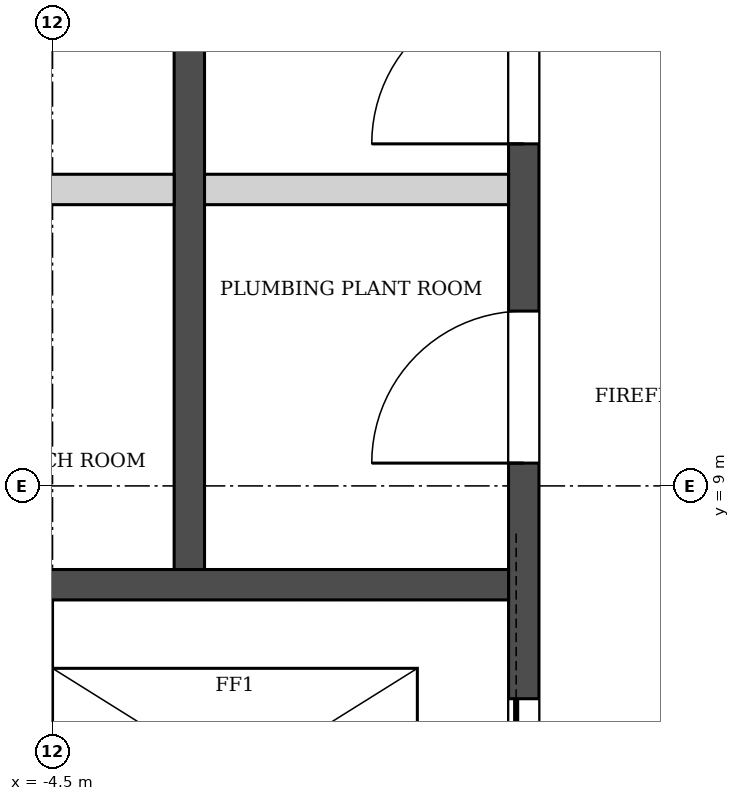
"""IFC4 building model, lengths in metres.
Left out: names, types, materials, properties, quantities, classifications, styles, units other than length and angle.
Written with IfcOpenShell. Run it as: python <this file> out.ifc"""

import sys

from ifc_helpers import new_model, si_unit, direction, frame, frame_2d, origin, place, context, subcontext, project, spatial, rectangle, extrude, element, fill, save


model = new_model("IFC4")
c1 = context("Model", 3, precision=1e-05, world=origin(), true_north=direction((0.0, 1.0)))
c2 = subcontext(c1, "Body", "Model", "MODEL_VIEW")
j1 = project(units=[si_unit("LENGTHUNIT", "METRE"), si_unit("PLANEANGLEUNIT", "RADIAN")], contexts=[c1])
p1 = place(None, origin())
s1 = spatial("IfcSite", under=j1, at=p1, CompositionType="ELEMENT")
p2 = place(p1, origin())
s2 = spatial("IfcBuilding", under=s1, at=p2, CompositionType="ELEMENT")
p3 = place(p2, frame((0.0, 0.0, 218.1)))
s3 = spatial("IfcBuildingStorey", under=s2, at=p3, CompositionType="ELEMENT", Elevation=218.1)
p4 = place(p3, frame((-4.353, 47.177, 0.0), z_axis=(0.0, 0.0, 1.0), x_axis=(-0.500000533701, -0.866025095652, 0.0)))
e1 = element("IfcWall", 1, at=p4, inside=s3, PredefinedType="SOLIDWALL", context=c2, shape_type="SweptSolid", body=[
    extrude(rectangle(XDim=45.573, YDim=0.34, at=frame_2d((22.787, 0.0))), origin(), (0.0, 0.0, 1.0), 5.0),
])
p5 = place(p4, frame((2.68, 0.0, 0.9)))
e2 = element("IfcOpeningElement", 2, at=p5, cuts=e1, PredefinedType="OPENING", context=c2, shape_type="SweptSolid", body=[
    extrude(rectangle(XDim=1.885, YDim=3.0, at=frame_2d((0.942, 1.5))), frame((0.0, 0.18, 0.0), z_axis=(0.0, -1.0, 0.0), x_axis=(1.0, 0.0, 0.0)), (0.0, 0.0, 1.0), 0.36),
])
p6 = place(p4, frame((5.68, 0.0, 0.9)))
e3 = element("IfcOpeningElement", 3, at=p6, cuts=e1, PredefinedType="OPENING", context=c2, shape_type="SweptSolid", body=[
    extrude(rectangle(XDim=1.885, YDim=3.0, at=frame_2d((0.942, 1.5))), frame((0.0, 0.18, 0.0), z_axis=(0.0, -1.0, 0.0), x_axis=(1.0, 0.0, 0.0)), (0.0, 0.0, 1.0), 0.36),
])
p7 = place(p4, frame((8.68, 0.0, 0.9)))
e4 = element("IfcOpeningElement", 4, at=p7, cuts=e1, PredefinedType="OPENING", context=c2, shape_type="SweptSolid", body=[
    extrude(rectangle(XDim=1.885, YDim=3.0, at=frame_2d((0.942, 1.5))), frame((0.0, 0.18, 0.0), z_axis=(0.0, -1.0, 0.0), x_axis=(1.0, 0.0, 0.0)), (0.0, 0.0, 1.0), 0.36),
])
p8 = place(p4, frame((11.68, 0.0, 0.9)))
e5 = element("IfcOpeningElement", 5, at=p8, cuts=e1, PredefinedType="OPENING", context=c2, shape_type="SweptSolid", body=[
    extrude(rectangle(XDim=1.885, YDim=3.0, at=frame_2d((0.942, 1.5))), frame((0.0, 0.18, 0.0), z_axis=(0.0, -1.0, 0.0), x_axis=(1.0, 0.0, 0.0)), (0.0, 0.0, 1.0), 0.36),
])
p9 = place(p4, frame((14.68, 0.0, 0.9)))
e6 = element("IfcOpeningElement", 6, at=p9, cuts=e1, PredefinedType="OPENING", context=c2, shape_type="SweptSolid", body=[
    extrude(rectangle(XDim=1.885, YDim=3.0, at=frame_2d((0.942, 1.5))), frame((0.0, 0.18, 0.0), z_axis=(0.0, -1.0, 0.0), x_axis=(1.0, 0.0, 0.0)), (0.0, 0.0, 1.0), 0.36),
])
p10 = place(p4, frame((17.68, 0.0, 0.9)))
e7 = element("IfcOpeningElement", 7, at=p10, cuts=e1, PredefinedType="OPENING", context=c2, shape_type="SweptSolid", body=[
    extrude(rectangle(XDim=1.885, YDim=3.0, at=frame_2d((0.942, 1.5))), frame((0.0, 0.18, 0.0), z_axis=(0.0, -1.0, 0.0), x_axis=(1.0, 0.0, 0.0)), (0.0, 0.0, 1.0), 0.36),
])
p11 = place(p4, frame((20.68, 0.0, 0.9)))
e8 = element("IfcOpeningElement", 8, at=p11, cuts=e1, PredefinedType="OPENING", context=c2, shape_type="SweptSolid", body=[
    extrude(rectangle(XDim=1.885, YDim=3.0, at=frame_2d((0.942, 1.5))), frame((0.0, 0.18, 0.0), z_axis=(0.0, -1.0, 0.0), x_axis=(1.0, 0.0, 0.0)), (0.0, 0.0, 1.0), 0.36),
])
p12 = place(p4, frame((23.68, 0.0, 0.9)))
e9 = element("IfcOpeningElement", 9, at=p12, cuts=e1, PredefinedType="OPENING", context=c2, shape_type="SweptSolid", body=[
    extrude(rectangle(XDim=1.885, YDim=3.0, at=frame_2d((0.942, 1.5))), frame((0.0, 0.18, 0.0), z_axis=(0.0, -1.0, 0.0), x_axis=(1.0, 0.0, 0.0)), (0.0, 0.0, 1.0), 0.36),
])
p13 = place(p4, frame((26.68, 0.0, 0.9)))
e10 = element("IfcOpeningElement", 10, at=p13, cuts=e1, PredefinedType="OPENING", context=c2, shape_type="SweptSolid", body=[
    extrude(rectangle(XDim=1.885, YDim=3.0, at=frame_2d((0.942, 1.5))), frame((0.0, 0.18, 0.0), z_axis=(0.0, -1.0, 0.0), x_axis=(1.0, 0.0, 0.0)), (0.0, 0.0, 1.0), 0.36),
])
p14 = place(p4, frame((29.68, 0.0, 0.9)))
e11 = element("IfcOpeningElement", 11, at=p14, cuts=e1, PredefinedType="OPENING", context=c2, shape_type="SweptSolid", body=[
    extrude(rectangle(XDim=1.885, YDim=3.0, at=frame_2d((0.942, 1.5))), frame((0.0, 0.18, 0.0), z_axis=(0.0, -1.0, 0.0), x_axis=(1.0, 0.0, 0.0)), (0.0, 0.0, 1.0), 0.36),
])
p15 = place(p4, frame((32.68, 0.0, 0.9)))
e12 = element("IfcOpeningElement", 12, at=p15, cuts=e1, PredefinedType="OPENING", context=c2, shape_type="SweptSolid", body=[
    extrude(rectangle(XDim=1.885, YDim=3.0, at=frame_2d((0.942, 1.5))), frame((0.0, 0.18, 0.0), z_axis=(0.0, -1.0, 0.0), x_axis=(1.0, 0.0, 0.0)), (0.0, 0.0, 1.0), 0.36),
])
p16 = place(p4, frame((35.68, 0.0, 0.9)))
e13 = element("IfcOpeningElement", 13, at=p16, cuts=e1, PredefinedType="OPENING", context=c2, shape_type="SweptSolid", body=[
    extrude(rectangle(XDim=1.885, YDim=3.0, at=frame_2d((0.942, 1.5))), frame((0.0, 0.18, 0.0), z_axis=(0.0, -1.0, 0.0), x_axis=(1.0, 0.0, 0.0)), (0.0, 0.0, 1.0), 0.36),
])
p17 = place(p4, frame((38.68, 0.0, 0.9)))
e14 = element("IfcOpeningElement", 14, at=p17, cuts=e1, PredefinedType="OPENING", context=c2, shape_type="SweptSolid", body=[
    extrude(rectangle(XDim=1.885, YDim=3.0, at=frame_2d((0.942, 1.5))), frame((0.0, 0.18, 0.0), z_axis=(0.0, -1.0, 0.0), x_axis=(1.0, 0.0, 0.0)), (0.0, 0.0, 1.0), 0.36),
])
p18 = place(p4, frame((41.68, 0.0, 0.9)))
e15 = element("IfcOpeningElement", 15, at=p18, cuts=e1, PredefinedType="OPENING", context=c2, shape_type="SweptSolid", body=[
    extrude(rectangle(XDim=1.885, YDim=3.0, at=frame_2d((0.942, 1.5))), frame((0.0, 0.18, 0.0), z_axis=(0.0, -1.0, 0.0), x_axis=(1.0, 0.0, 0.0)), (0.0, 0.0, 1.0), 0.36),
])
p19 = place(p3, frame((-3.6, 8.45, -0.4), z_axis=(0.0, 0.0, 1.0), x_axis=(0.0, 1.0, 0.0)))
e16 = element("IfcWall", 16, at=p19, inside=s3, PredefinedType="SOLIDWALL", context=c2, shape_type="SweptSolid", body=[
    extrude(rectangle(XDim=7.8, YDim=0.2, at=frame_2d((3.9, 0.0))), origin(), (0.0, 0.0, 1.0), 5.4),
])
p20 = place(p3, frame((-1.4, 5.85, -0.4), z_axis=(0.0, 0.0, 1.0), x_axis=(0.0, 1.0, 0.0)))
e17 = element("IfcWall", 17, at=p20, inside=s3, PredefinedType="SOLIDWALL", context=c2, shape_type="SweptSolid", body=[
    extrude(rectangle(XDim=11.75, YDim=0.2, at=frame_2d((5.875, 0.0))), origin(), (0.0, 0.0, 1.0), 5.4),
])
p21 = place(p20, frame((0.65, 0.0, 0.4)))
e18 = element("IfcOpeningElement", 18, at=p21, cuts=e17, PredefinedType="OPENING", context=c2, shape_type="SweptSolid", body=[
    extrude(rectangle(XDim=1.1, YDim=2.1, at=frame_2d((0.55, 1.05))), frame((0.0, 0.11, 0.0), z_axis=(0.0, -1.0, 0.0), x_axis=(1.0, 0.0, 0.0)), (0.0, 0.0, 1.0), 0.22),
])
p22 = place(p20, frame((3.3, 0.0, 0.4)))
e19 = element("IfcOpeningElement", 19, at=p22, cuts=e17, PredefinedType="OPENING", context=c2, shape_type="SweptSolid", body=[
    extrude(rectangle(XDim=1.0, YDim=2.1, at=frame_2d((0.5, 1.05))), frame((0.0, 0.11, 0.0), z_axis=(0.0, -1.0, 0.0), x_axis=(1.0, 0.0, 0.0)), (0.0, 0.0, 1.0), 0.22),
])
p23 = place(p20, frame((5.4, 0.0, 0.4)))
e20 = element("IfcOpeningElement", 20, at=p23, cuts=e17, PredefinedType="OPENING", context=c2, shape_type="SweptSolid", body=[
    extrude(rectangle(XDim=1.0, YDim=2.1, at=frame_2d((0.5, 1.05))), frame((0.0, 0.11, 0.0), z_axis=(0.0, -1.0, 0.0), x_axis=(1.0, 0.0, 0.0)), (0.0, 0.0, 1.0), 0.22),
])
p24 = place(p3, frame((-5.7, 8.35, -0.4), z_axis=(0.0, 0.0, 1.0), x_axis=(1.0, 0.0, 0.0)))
e21 = element("IfcWall", 21, at=p24, inside=s3, PredefinedType="SOLIDWALL", context=c2, shape_type="SweptSolid", body=[
    extrude(rectangle(XDim=4.2, YDim=0.2, at=frame_2d((2.1, 0.0))), origin(), (0.0, 0.0, 1.0), 5.4),
])
for number, where, z_axis, x_axis in (
    (22, (-5.7, 10.95, 0.0), (0.0, 0.0, 1.0), (1.0, 0.0, 0.0)),
    (23, (-3.5, 10.95, 0.0), (0.0, 0.0, 1.0), (1.0, 0.0, 0.0)),
):
    element("IfcWall", number, at=place(p3, frame(where, z_axis=z_axis, x_axis=x_axis)), inside=s3, PredefinedType="SOLIDWALL", context=c2, shape_type="SweptSolid", body=[
        extrude(rectangle(XDim=2.0, YDim=0.2, at=frame_2d((1.0, 0.0))), origin(), (0.0, 0.0, 1.0), 5.0),
    ])
p25 = place(p21, origin())
e24 = element("IfcDoor", 24, at=p25, inside=s3, OperationType="SLIDING_TO_RIGHT", PredefinedType="DOOR", context=c2, shape_type="SweptSolid", body=[
    extrude(rectangle(XDim=1.1, YDim=2.1, at=frame_2d((0.55, 1.05))), frame((0.0, 0.025, 0.0), z_axis=(0.0, -1.0, 0.0), x_axis=(1.0, 0.0, 0.0)), (0.0, 0.0, 1.0), 0.05),
])
fill(e18, e24)
p26 = place(p22, origin())
e25 = element("IfcDoor", 25, at=p26, inside=s3, OperationType="SINGLE_SWING_LEFT", PredefinedType="DOOR", context=c2, shape_type="SweptSolid", body=[
    extrude(rectangle(XDim=1.0, YDim=2.1, at=frame_2d((0.5, 1.05))), frame((0.0, 0.025, 0.0), z_axis=(0.0, -1.0, 0.0), x_axis=(1.0, 0.0, 0.0)), (0.0, 0.0, 1.0), 0.05),
])
fill(e19, e25)
p27 = place(p23, origin())
e26 = element("IfcDoor", 26, at=p27, inside=s3, OperationType="SINGLE_SWING_LEFT", PredefinedType="DOOR", context=c2, shape_type="SweptSolid", body=[
    extrude(rectangle(XDim=1.0, YDim=2.1, at=frame_2d((0.5, 1.05))), frame((0.0, 0.025, 0.0), z_axis=(0.0, -1.0, 0.0), x_axis=(1.0, 0.0, 0.0)), (0.0, 0.0, 1.0), 0.05),
])
fill(e20, e26)
save(model, sys.argv[1])
